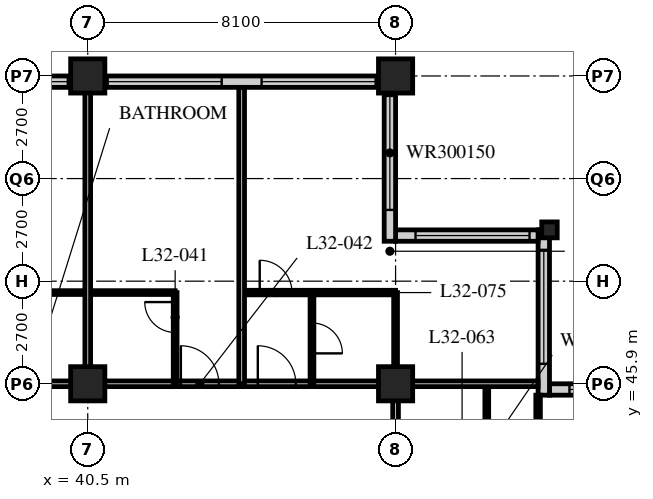
"""IFC4 building model, lengths in metres.
Left out: names, types, materials, properties, quantities, classifications, styles, units other than length and angle.
Written with IfcOpenShell. Run it as: python <this file> out.ifc"""

import sys

from ifc_helpers import new_model, si_unit, direction, frame, frame_2d, origin, origin_2d, place, context, subcontext, project, spatial, rectangle, hollow_rectangle, i_section, extrude, element, fill, save


model = new_model("IFC4")
c1 = context("Model", 3, precision=1e-05, world=origin(), true_north=direction((0.0, 1.0)))
c2 = subcontext(c1, "Body", "Model", "MODEL_VIEW")
j1 = project(units=[si_unit("LENGTHUNIT", "METRE"), si_unit("PLANEANGLEUNIT", "RADIAN")], contexts=[c1])
p1 = place(None, origin())
s1 = spatial("IfcSite", under=j1, at=p1, CompositionType="ELEMENT")
p2 = place(p1, origin())
s2 = spatial("IfcBuilding", under=s1, at=p2, CompositionType="ELEMENT")
p3 = place(p2, frame((0.0, 0.0, 127.2)))
s3 = spatial("IfcBuildingStorey", under=s2, at=p3, CompositionType="ELEMENT", Elevation=127.2)
for number, where, z_axis, x_axis in (
    (1, (40.5, 45.9, 0.0), (0.0, 0.0, 1.0), (1.0, 0.0, 0.0)),
    (2, (40.5, 54.0, 0.0), (0.0, 0.0, 1.0), (1.0, 0.0, 0.0)),
    (3, (48.6, 45.9, 0.0), (0.0, 0.0, 1.0), (1.0, 0.0, 0.0)),
    (4, (48.6, 54.0, 0.0), (0.0, 0.0, 1.0), (1.0, 0.0, 0.0)),
):
    element("IfcColumn", number, at=place(p3, frame(where, z_axis=z_axis, x_axis=x_axis)), inside=s3, PredefinedType="COLUMN", context=c2, shape_type="SweptSolid", body=[
        extrude(hollow_rectangle(XDim=0.9, YDim=0.9, WallThickness=0.09, at=origin_2d()), origin(), (0.0, 0.0, 1.0), 3.4),
    ])
p4 = place(p3, frame((52.65, 49.95, 0.0), z_axis=(0.0, 0.0, 1.0), x_axis=(1.0, 0.0, 0.0)))
e5 = element("IfcColumn", 5, at=p4, inside=s3, PredefinedType="COLUMN", context=c2, shape_type="SweptSolid", body=[
    extrude(i_section(OverallWidth=0.407, OverallDepth=0.419, WebThickness=0.031, FlangeThickness=0.049, FilletRadius=0.015, at=origin_2d()), origin(), (0.0, 0.0, 1.0), 3.4),
])
p5 = place(p3, frame((56.4, 45.75, 0.0), z_axis=(0.0, 0.0, 1.0), x_axis=(-1.0, 0.0, 0.0)))
e6 = element("IfcWall", 6, at=p5, inside=s3, PredefinedType="SOLIDWALL", context=c2, shape_type="SweptSolid", body=[
    extrude(rectangle(XDim=3.75, YDim=0.3, at=frame_2d((1.875, 0.0))), origin(), (0.0, 0.0, 1.0), 3.19),
])
p6 = place(p5, frame((0.225, 0.0, 0.9)))
e7 = element("IfcOpeningElement", 7, at=p6, cuts=e6, PredefinedType="OPENING", context=c2, shape_type="SweptSolid", body=[
    extrude(rectangle(XDim=3.0, YDim=1.5, at=frame_2d((1.5, 0.75))), frame((0.0, 0.16, 0.0), z_axis=(0.0, -1.0, 0.0), x_axis=(1.0, 0.0, 0.0)), (0.0, 0.0, 1.0), 0.32),
])
p7 = place(p3, frame((52.5, 45.6, 0.0), z_axis=(0.0, 0.0, 1.0), x_axis=(0.0, 1.0, 0.0)))
e8 = element("IfcWall", 8, at=p7, inside=s3, PredefinedType="SOLIDWALL", context=c2, shape_type="SweptSolid", body=[
    extrude(rectangle(XDim=4.35, YDim=0.3, at=frame_2d((2.175, 0.0))), origin(), (0.0, 0.0, 1.0), 3.19),
])
p8 = place(p7, frame((0.825, 0.0, 0.9)))
e9 = element("IfcOpeningElement", 9, at=p8, cuts=e8, PredefinedType="OPENING", context=c2, shape_type="SweptSolid", body=[
    extrude(rectangle(XDim=3.0, YDim=1.5, at=frame_2d((1.5, 0.75))), frame((0.0, 0.16, 0.0), z_axis=(0.0, -1.0, 0.0), x_axis=(1.0, 0.0, 0.0)), (0.0, 0.0, 1.0), 0.32),
])
p9 = place(p3, frame((52.35, 49.8, 0.0), z_axis=(0.0, 0.0, 1.0), x_axis=(-1.0, 0.0, 0.0)))
e10 = element("IfcWall", 10, at=p9, inside=s3, PredefinedType="SOLIDWALL", context=c2, shape_type="SweptSolid", body=[
    extrude(rectangle(XDim=3.75, YDim=0.3, at=frame_2d((1.875, 0.0))), origin(), (0.0, 0.0, 1.0), 3.19),
])
p10 = place(p9, frame((0.225, 0.0, 0.9)))
e11 = element("IfcOpeningElement", 11, at=p10, cuts=e10, PredefinedType="OPENING", context=c2, shape_type="SweptSolid", body=[
    extrude(rectangle(XDim=3.0, YDim=1.5, at=frame_2d((1.5, 0.75))), frame((0.0, 0.16, 0.0), z_axis=(0.0, -1.0, 0.0), x_axis=(1.0, 0.0, 0.0)), (0.0, 0.0, 1.0), 0.32),
])
p11 = place(p3, frame((48.45, 49.65, 0.0), z_axis=(0.0, 0.0, 1.0), x_axis=(0.0, 1.0, 0.0)))
e12 = element("IfcWall", 12, at=p11, inside=s3, PredefinedType="SOLIDWALL", context=c2, shape_type="SweptSolid", body=[
    extrude(rectangle(XDim=4.35, YDim=0.3, at=frame_2d((2.175, 0.0))), origin(), (0.0, 0.0, 1.0), 3.19),
])
p12 = place(p11, frame((0.825, 0.0, 0.9)))
e13 = element("IfcOpeningElement", 13, at=p12, cuts=e12, PredefinedType="OPENING", context=c2, shape_type="SweptSolid", body=[
    extrude(rectangle(XDim=3.0, YDim=1.5, at=frame_2d((1.5, 0.75))), frame((0.0, 0.16, 0.0), z_axis=(0.0, -1.0, 0.0), x_axis=(1.0, 0.0, 0.0)), (0.0, 0.0, 1.0), 0.32),
])
p13 = place(p3, frame((48.3, 53.85, 0.0), z_axis=(0.0, 0.0, 1.0), x_axis=(-1.0, 0.0, 0.0)))
e14 = element("IfcWall", 14, at=p13, inside=s3, PredefinedType="SOLIDWALL", context=c2, shape_type="SweptSolid", body=[
    extrude(rectangle(XDim=40.2, YDim=0.3, at=frame_2d((20.1, 0.0))), origin(), (0.0, 0.0, 1.0), 3.19),
])
p14 = place(p13, frame((0.225, 0.0, 0.9)))
e15 = element("IfcOpeningElement", 15, at=p14, cuts=e14, PredefinedType="OPENING", context=c2, shape_type="SweptSolid", body=[
    extrude(rectangle(XDim=3.0, YDim=2.0, at=frame_2d((1.5, 1.0))), frame((0.0, 0.16, 0.0), z_axis=(0.0, -1.0, 0.0), x_axis=(1.0, 0.0, 0.0)), (0.0, 0.0, 1.0), 0.32),
])
p15 = place(p13, frame((4.275, 0.0, 0.9)))
e16 = element("IfcOpeningElement", 16, at=p15, cuts=e14, PredefinedType="OPENING", context=c2, shape_type="SweptSolid", body=[
    extrude(rectangle(XDim=3.0, YDim=2.0, at=frame_2d((1.5, 1.0))), frame((0.0, 0.16, 0.0), z_axis=(0.0, -1.0, 0.0), x_axis=(1.0, 0.0, 0.0)), (0.0, 0.0, 1.0), 0.32),
])
p16 = place(p13, frame((8.325, 0.0, 0.9)))
e17 = element("IfcOpeningElement", 17, at=p16, cuts=e14, PredefinedType="OPENING", context=c2, shape_type="SweptSolid", body=[
    extrude(rectangle(XDim=3.0, YDim=2.0, at=frame_2d((1.5, 1.0))), frame((0.0, 0.16, 0.0), z_axis=(0.0, -1.0, 0.0), x_axis=(1.0, 0.0, 0.0)), (0.0, 0.0, 1.0), 0.32),
])
p17 = place(p13, frame((12.375, 0.0, 0.9)))
e18 = element("IfcOpeningElement", 18, at=p17, cuts=e14, PredefinedType="OPENING", context=c2, shape_type="SweptSolid", body=[
    extrude(rectangle(XDim=3.0, YDim=2.0, at=frame_2d((1.5, 1.0))), frame((0.0, 0.16, 0.0), z_axis=(0.0, -1.0, 0.0), x_axis=(1.0, 0.0, 0.0)), (0.0, 0.0, 1.0), 0.32),
])
p18 = place(p13, frame((16.425, 0.0, 0.9)))
e19 = element("IfcOpeningElement", 19, at=p18, cuts=e14, PredefinedType="OPENING", context=c2, shape_type="SweptSolid", body=[
    extrude(rectangle(XDim=3.0, YDim=2.0, at=frame_2d((1.5, 1.0))), frame((0.0, 0.16, 0.0), z_axis=(0.0, -1.0, 0.0), x_axis=(1.0, 0.0, 0.0)), (0.0, 0.0, 1.0), 0.32),
])
p19 = place(p13, frame((20.475, 0.0, 0.9)))
e20 = element("IfcOpeningElement", 20, at=p19, cuts=e14, PredefinedType="OPENING", context=c2, shape_type="SweptSolid", body=[
    extrude(rectangle(XDim=3.0, YDim=2.0, at=frame_2d((1.5, 1.0))), frame((0.0, 0.16, 0.0), z_axis=(0.0, -1.0, 0.0), x_axis=(1.0, 0.0, 0.0)), (0.0, 0.0, 1.0), 0.32),
])
p20 = place(p13, frame((24.525, 0.0, 0.9)))
e21 = element("IfcOpeningElement", 21, at=p20, cuts=e14, PredefinedType="OPENING", context=c2, shape_type="SweptSolid", body=[
    extrude(rectangle(XDim=3.0, YDim=2.0, at=frame_2d((1.5, 1.0))), frame((0.0, 0.16, 0.0), z_axis=(0.0, -1.0, 0.0), x_axis=(1.0, 0.0, 0.0)), (0.0, 0.0, 1.0), 0.32),
])
p21 = place(p13, frame((28.575, 0.0, 0.9)))
e22 = element("IfcOpeningElement", 22, at=p21, cuts=e14, PredefinedType="OPENING", context=c2, shape_type="SweptSolid", body=[
    extrude(rectangle(XDim=3.0, YDim=2.0, at=frame_2d((1.5, 1.0))), frame((0.0, 0.16, 0.0), z_axis=(0.0, -1.0, 0.0), x_axis=(1.0, 0.0, 0.0)), (0.0, 0.0, 1.0), 0.32),
])
p22 = place(p13, frame((32.625, 0.0, 0.9)))
e23 = element("IfcOpeningElement", 23, at=p22, cuts=e14, PredefinedType="OPENING", context=c2, shape_type="SweptSolid", body=[
    extrude(rectangle(XDim=3.0, YDim=2.0, at=frame_2d((1.5, 1.0))), frame((0.0, 0.16, 0.0), z_axis=(0.0, -1.0, 0.0), x_axis=(1.0, 0.0, 0.0)), (0.0, 0.0, 1.0), 0.32),
])
p23 = place(p13, frame((36.675, 0.0, 0.9)))
e24 = element("IfcOpeningElement", 24, at=p23, cuts=e14, PredefinedType="OPENING", context=c2, shape_type="SweptSolid", body=[
    extrude(rectangle(XDim=3.0, YDim=2.0, at=frame_2d((1.5, 1.0))), frame((0.0, 0.16, 0.0), z_axis=(0.0, -1.0, 0.0), x_axis=(1.0, 0.0, 0.0)), (0.0, 0.0, 1.0), 0.32),
])
p24 = place(p3, frame((8.1, 45.9, 0.0), z_axis=(0.0, 0.0, 1.0), x_axis=(1.0, 0.0, 0.0)))
e25 = element("IfcWall", 25, at=p24, inside=s3, PredefinedType="PARTITIONING", context=c2, shape_type="SweptSolid", body=[
    extrude(rectangle(XDim=40.5, YDim=0.15, at=frame_2d((20.25, 0.0))), origin(), (0.0, 0.0, 1.0), 2.578),
])
p25 = place(p24, frame((9.625, 0.0, 0.0)))
e26 = element("IfcOpeningElement", 26, at=p25, cuts=e25, PredefinedType="OPENING", context=c2, shape_type="SweptSolid", body=[
    extrude(rectangle(XDim=1.0, YDim=2.1, at=frame_2d((0.5, 1.05))), frame((0.0, 0.085, 0.0), z_axis=(0.0, -1.0, 0.0), x_axis=(1.0, 0.0, 0.0)), (0.0, 0.0, 1.0), 0.17),
])
p26 = place(p24, frame((21.65, 0.0, 0.0)))
e27 = element("IfcOpeningElement", 27, at=p26, cuts=e25, PredefinedType="OPENING", context=c2, shape_type="SweptSolid", body=[
    extrude(rectangle(XDim=1.0, YDim=2.1, at=frame_2d((0.5, 1.05))), frame((0.0, 0.085, 0.0), z_axis=(0.0, -1.0, 0.0), x_axis=(1.0, 0.0, 0.0)), (0.0, 0.0, 1.0), 0.17),
])
p27 = place(p24, frame((26.75, 0.0, 0.0)))
e28 = element("IfcOpeningElement", 28, at=p27, cuts=e25, PredefinedType="OPENING", context=c2, shape_type="SweptSolid", body=[
    extrude(rectangle(XDim=1.0, YDim=2.1, at=frame_2d((0.5, 1.05))), frame((0.0, 0.085, 0.0), z_axis=(0.0, -1.0, 0.0), x_axis=(1.0, 0.0, 0.0)), (0.0, 0.0, 1.0), 0.17),
])
p28 = place(p24, frame((28.95, 0.0, 0.0)))
e29 = element("IfcOpeningElement", 29, at=p28, cuts=e25, PredefinedType="OPENING", context=c2, shape_type="SweptSolid", body=[
    extrude(rectangle(XDim=1.0, YDim=2.1, at=frame_2d((0.5, 1.05))), frame((0.0, 0.085, 0.0), z_axis=(0.0, -1.0, 0.0), x_axis=(1.0, 0.0, 0.0)), (0.0, 0.0, 1.0), 0.17),
])
p29 = place(p24, frame((34.85, 0.0, 0.0)))
e30 = element("IfcOpeningElement", 30, at=p29, cuts=e25, PredefinedType="OPENING", context=c2, shape_type="SweptSolid", body=[
    extrude(rectangle(XDim=1.0, YDim=2.1, at=frame_2d((0.5, 1.05))), frame((0.0, 0.085, 0.0), z_axis=(0.0, -1.0, 0.0), x_axis=(1.0, 0.0, 0.0)), (0.0, 0.0, 1.0), 0.17),
])
p30 = place(p24, frame((36.875, 0.0, 0.0)))
e31 = element("IfcOpeningElement", 31, at=p30, cuts=e25, PredefinedType="OPENING", context=c2, shape_type="SweptSolid", body=[
    extrude(rectangle(XDim=1.0, YDim=2.1, at=frame_2d((0.5, 1.05))), frame((0.0, 0.085, 0.0), z_axis=(0.0, -1.0, 0.0), x_axis=(1.0, 0.0, 0.0)), (0.0, 0.0, 1.0), 0.17),
])
p31 = place(p24, frame((2.625, 0.0, 0.0)))
e32 = element("IfcOpeningElement", 32, at=p31, cuts=e25, PredefinedType="OPENING", context=c2, shape_type="SweptSolid", body=[
    extrude(rectangle(XDim=1.0, YDim=2.1, at=frame_2d((0.5, 1.05))), frame((0.0, 0.085, 0.0), z_axis=(0.0, -1.0, 0.0), x_axis=(1.0, 0.0, 0.0)), (0.0, 0.0, 1.0), 0.17),
])
p32 = place(p3, frame((48.6, 21.6, 0.0), z_axis=(0.0, 0.0, 1.0), x_axis=(0.0, 1.0, 0.0)))
e33 = element("IfcWall", 33, at=p32, inside=s3, PredefinedType="PARTITIONING", context=c2, shape_type="SweptSolid", body=[
    extrude(rectangle(XDim=24.3, YDim=0.15, at=frame_2d((12.15, 0.0))), origin(), (0.0, 0.0, 1.0), 2.578),
])
p33 = place(p32, frame((2.75, 0.0, 0.0)))
e34 = element("IfcOpeningElement", 34, at=p33, cuts=e33, PredefinedType="OPENING", context=c2, shape_type="SweptSolid", body=[
    extrude(rectangle(XDim=1.0, YDim=2.1, at=frame_2d((0.5, 1.05))), frame((0.0, 0.085, 0.0), z_axis=(0.0, -1.0, 0.0), x_axis=(1.0, 0.0, 0.0)), (0.0, 0.0, 1.0), 0.17),
])
p34 = place(p32, frame((4.65, 0.0, 0.0)))
e35 = element("IfcOpeningElement", 35, at=p34, cuts=e33, PredefinedType="OPENING", context=c2, shape_type="SweptSolid", body=[
    extrude(rectangle(XDim=1.0, YDim=2.1, at=frame_2d((0.5, 1.05))), frame((0.0, 0.085, 0.0), z_axis=(0.0, -1.0, 0.0), x_axis=(1.0, 0.0, 0.0)), (0.0, 0.0, 1.0), 0.17),
])
p35 = place(p32, frame((10.0, 0.0, 0.0)))
e36 = element("IfcOpeningElement", 36, at=p35, cuts=e33, PredefinedType="OPENING", context=c2, shape_type="SweptSolid", body=[
    extrude(rectangle(XDim=1.0, YDim=2.1, at=frame_2d((0.5, 1.05))), frame((0.0, 0.085, 0.0), z_axis=(0.0, -1.0, 0.0), x_axis=(1.0, 0.0, 0.0)), (0.0, 0.0, 1.0), 0.17),
])
p36 = place(p32, frame((18.1, 0.0, 0.0)))
e37 = element("IfcOpeningElement", 37, at=p36, cuts=e33, PredefinedType="OPENING", context=c2, shape_type="SweptSolid", body=[
    extrude(rectangle(XDim=1.0, YDim=2.1, at=frame_2d((0.5, 1.05))), frame((0.0, 0.085, 0.0), z_axis=(0.0, -1.0, 0.0), x_axis=(1.0, 0.0, 0.0)), (0.0, 0.0, 1.0), 0.17),
])
p37 = place(p3, frame((38.2, 48.3, 0.0), z_axis=(0.0, 0.0, 1.0), x_axis=(1.0, 0.0, 0.0)))
e38 = element("IfcWall", 38, at=p37, inside=s3, PredefinedType="PARTITIONING", context=c2, shape_type="SweptSolid", body=[
    extrude(rectangle(XDim=4.6, YDim=0.1, at=frame_2d((2.3, 0.0))), origin(), (0.0, 0.0, 1.0), 3.19),
])
p38 = place(p3, frame((40.5, 45.9, 0.0), z_axis=(0.0, 0.0, 1.0), x_axis=(0.0, 1.0, 0.0)))
e39 = element("IfcWall", 39, at=p38, inside=s3, PredefinedType="PARTITIONING", context=c2, shape_type="SweptSolid", body=[
    extrude(rectangle(XDim=7.8, YDim=0.15, at=frame_2d((3.9, 0.0))), origin(), (0.0, 0.0, 1.0), 2.578),
])
p39 = place(p3, frame((42.8, 45.9, 0.0), z_axis=(0.0, 0.0, 1.0), x_axis=(0.0, 1.0, 0.0)))
e40 = element("IfcWall", 40, at=p39, inside=s3, PredefinedType="PARTITIONING", context=c2, shape_type="SweptSolid", body=[
    extrude(rectangle(XDim=2.4, YDim=0.1, at=frame_2d((1.2, 0.0))), origin(), (0.0, 0.0, 1.0), 3.19),
])
p40 = place(p39, frame((1.35, 0.0, 0.0)))
e41 = element("IfcOpeningElement", 41, at=p40, cuts=e40, PredefinedType="OPENING", context=c2, shape_type="SweptSolid", body=[
    extrude(rectangle(XDim=0.8, YDim=2.1, at=frame_2d((0.4, 1.05))), frame((0.0, 0.06, 0.0), z_axis=(0.0, -1.0, 0.0), x_axis=(1.0, 0.0, 0.0)), (0.0, 0.0, 1.0), 0.12),
])
p41 = place(p3, frame((51.0, 43.3, 0.0), z_axis=(0.0, 0.0, 1.0), x_axis=(0.0, 1.0, 0.0)))
e42 = element("IfcWall", 42, at=p41, inside=s3, PredefinedType="PARTITIONING", context=c2, shape_type="SweptSolid", body=[
    extrude(rectangle(XDim=2.6, YDim=0.1, at=frame_2d((1.3, 0.0))), origin(), (0.0, 0.0, 1.0), 3.19),
])
p42 = place(p3, frame((44.55, 48.3, 0.0), z_axis=(0.0, 0.0, 1.0), x_axis=(1.0, 0.0, 0.0)))
e43 = element("IfcWall", 43, at=p42, inside=s3, PredefinedType="PARTITIONING", context=c2, shape_type="SweptSolid", body=[
    extrude(rectangle(XDim=4.05, YDim=0.12, at=frame_2d((2.025, 0.0))), origin(), (0.0, 0.0, 1.0), 3.19),
])
p43 = place(p42, frame((0.475, 0.0, 0.0)))
e44 = element("IfcOpeningElement", 44, at=p43, cuts=e43, PredefinedType="OPENING", context=c2, shape_type="SweptSolid", body=[
    extrude(rectangle(XDim=0.85, YDim=2.1, at=frame_2d((0.425, 1.05))), frame((0.0, 0.07, 0.0), z_axis=(0.0, -1.0, 0.0), x_axis=(1.0, 0.0, 0.0)), (0.0, 0.0, 1.0), 0.14),
])
p44 = place(p3, frame((46.4, 45.9, 0.0), z_axis=(0.0, 0.0, 1.0), x_axis=(0.0, 1.0, 0.0)))
e45 = element("IfcWall", 45, at=p44, inside=s3, PredefinedType="PARTITIONING", context=c2, shape_type="SweptSolid", body=[
    extrude(rectangle(XDim=2.4, YDim=0.1, at=frame_2d((1.2, 0.0))), origin(), (0.0, 0.0, 1.0), 3.19),
])
p45 = place(p44, frame((0.8, 0.0, 0.0)))
e46 = element("IfcOpeningElement", 46, at=p45, cuts=e45, PredefinedType="OPENING", context=c2, shape_type="SweptSolid", body=[
    extrude(rectangle(XDim=0.8, YDim=2.1, at=frame_2d((0.4, 1.05))), frame((0.0, 0.06, 0.0), z_axis=(0.0, -1.0, 0.0), x_axis=(1.0, 0.0, 0.0)), (0.0, 0.0, 1.0), 0.12),
])
p46 = place(p3, frame((48.6, 45.9, 0.0), z_axis=(0.0, 0.0, 1.0), x_axis=(0.0, 1.0, 0.0)))
e47 = element("IfcWall", 47, at=p46, inside=s3, PredefinedType="PARTITIONING", context=c2, shape_type="SweptSolid", body=[
    extrude(rectangle(XDim=2.4, YDim=0.1, at=frame_2d((1.2, 0.0))), origin(), (0.0, 0.0, 1.0), 2.578),
])
p47 = place(p3, frame((48.6, 45.9, 0.0), z_axis=(0.0, 0.0, 1.0), x_axis=(1.0, 0.0, 0.0)))
e48 = element("IfcWall", 48, at=p47, inside=s3, PredefinedType="PARTITIONING", context=c2, shape_type="SweptSolid", body=[
    extrude(rectangle(XDim=3.75, YDim=0.15, at=frame_2d((1.875, 0.0))), origin(), (0.0, 0.0, 1.0), 2.578),
])
p48 = place(p3, frame((44.55, 45.9, 0.0), z_axis=(0.0, 0.0, 1.0), x_axis=(0.0, 1.0, 0.0)))
e49 = element("IfcWall", 49, at=p48, inside=s3, PredefinedType="PARTITIONING", context=c2, shape_type="SweptSolid", body=[
    extrude(rectangle(XDim=7.8, YDim=0.15, at=frame_2d((3.9, 0.0))), origin(), (0.0, 0.0, 1.0), 3.19),
])
p49 = place(p3, frame((52.35, 45.6, 0.0), z_axis=(0.0, 0.0, 1.0), x_axis=(0.0, -1.0, 0.0)))
e50 = element("IfcWall", 50, at=p49, inside=s3, PredefinedType="PARTITIONING", context=c2, shape_type="SweptSolid", body=[
    extrude(rectangle(XDim=3.75, YDim=0.12, at=frame_2d((1.875, 0.0))), origin(), (0.0, 0.0, 1.0), 3.19),
])
p50 = place(p49, frame((2.625, 0.0, 0.0)))
e51 = element("IfcOpeningElement", 51, at=p50, cuts=e50, PredefinedType="OPENING", context=c2, shape_type="SweptSolid", body=[
    extrude(rectangle(XDim=0.85, YDim=2.1, at=frame_2d((0.425, 1.05))), frame((0.0, 0.07, 0.0), z_axis=(0.0, -1.0, 0.0), x_axis=(1.0, 0.0, 0.0)), (0.0, 0.0, 1.0), 0.14),
])
p51 = place(p6, origin())
e52 = element("IfcWindow", 52, at=p51, inside=s3, PartitioningType="SINGLE_PANEL", PredefinedType="WINDOW", context=c2, shape_type="SweptSolid", body=[
    extrude(rectangle(XDim=3.0, YDim=1.5, at=frame_2d((1.5, 0.75))), frame((0.0, 0.03, 0.0), z_axis=(0.0, -1.0, 0.0), x_axis=(1.0, 0.0, 0.0)), (0.0, 0.0, 1.0), 0.06),
])
fill(e7, e52)
p52 = place(p8, origin())
e53 = element("IfcWindow", 53, at=p52, inside=s3, PartitioningType="SINGLE_PANEL", PredefinedType="WINDOW", context=c2, shape_type="SweptSolid", body=[
    extrude(rectangle(XDim=3.0, YDim=1.5, at=frame_2d((1.5, 0.75))), frame((0.0, 0.03, 0.0), z_axis=(0.0, -1.0, 0.0), x_axis=(1.0, 0.0, 0.0)), (0.0, 0.0, 1.0), 0.06),
])
fill(e9, e53)
p53 = place(p10, origin())
e54 = element("IfcWindow", 54, at=p53, inside=s3, PartitioningType="SINGLE_PANEL", PredefinedType="WINDOW", context=c2, shape_type="SweptSolid", body=[
    extrude(rectangle(XDim=3.0, YDim=1.5, at=frame_2d((1.5, 0.75))), frame((0.0, 0.03, 0.0), z_axis=(0.0, -1.0, 0.0), x_axis=(1.0, 0.0, 0.0)), (0.0, 0.0, 1.0), 0.06),
])
fill(e11, e54)
p54 = place(p12, origin())
e55 = element("IfcWindow", 55, at=p54, inside=s3, PartitioningType="SINGLE_PANEL", PredefinedType="WINDOW", context=c2, shape_type="SweptSolid", body=[
    extrude(rectangle(XDim=3.0, YDim=1.5, at=frame_2d((1.5, 0.75))), frame((0.0, 0.03, 0.0), z_axis=(0.0, -1.0, 0.0), x_axis=(1.0, 0.0, 0.0)), (0.0, 0.0, 1.0), 0.06),
])
fill(e13, e55)
p55 = place(p14, origin())
e56 = element("IfcWindow", 56, at=p55, inside=s3, PartitioningType="SINGLE_PANEL", PredefinedType="WINDOW", context=c2, shape_type="SweptSolid", body=[
    extrude(rectangle(XDim=3.0, YDim=2.0, at=frame_2d((1.5, 1.0))), frame((0.0, 0.03, 0.0), z_axis=(0.0, -1.0, 0.0), x_axis=(1.0, 0.0, 0.0)), (0.0, 0.0, 1.0), 0.06),
])
fill(e15, e56)
p56 = place(p15, origin())
e57 = element("IfcWindow", 57, at=p56, inside=s3, PartitioningType="SINGLE_PANEL", PredefinedType="WINDOW", context=c2, shape_type="SweptSolid", body=[
    extrude(rectangle(XDim=3.0, YDim=2.0, at=frame_2d((1.5, 1.0))), frame((0.0, 0.03, 0.0), z_axis=(0.0, -1.0, 0.0), x_axis=(1.0, 0.0, 0.0)), (0.0, 0.0, 1.0), 0.06),
])
fill(e16, e57)
p57 = place(p16, origin())
e58 = element("IfcWindow", 58, at=p57, inside=s3, PartitioningType="SINGLE_PANEL", PredefinedType="WINDOW", context=c2, shape_type="SweptSolid", body=[
    extrude(rectangle(XDim=3.0, YDim=2.0, at=frame_2d((1.5, 1.0))), frame((0.0, 0.03, 0.0), z_axis=(0.0, -1.0, 0.0), x_axis=(1.0, 0.0, 0.0)), (0.0, 0.0, 1.0), 0.06),
])
fill(e17, e58)
p58 = place(p40, origin())
e59 = element("IfcDoor", 59, at=p58, inside=s3, OperationType="SINGLE_SWING_RIGHT", PredefinedType="DOOR", context=c2, shape_type="SweptSolid", body=[
    extrude(rectangle(XDim=0.8, YDim=2.1, at=frame_2d((0.4, 1.05))), frame((0.0, 0.025, 0.0), z_axis=(0.0, -1.0, 0.0), x_axis=(1.0, 0.0, 0.0)), (0.0, 0.0, 1.0), 0.05),
])
fill(e41, e59)
p59 = place(p29, origin())
e60 = element("IfcDoor", 60, at=p59, inside=s3, OperationType="SINGLE_SWING_LEFT", PredefinedType="DOOR", context=c2, shape_type="SweptSolid", body=[
    extrude(rectangle(XDim=1.0, YDim=2.1, at=frame_2d((0.5, 1.05))), frame((0.0, 0.025, 0.0), z_axis=(0.0, -1.0, 0.0), x_axis=(1.0, 0.0, 0.0)), (0.0, 0.0, 1.0), 0.05),
])
fill(e30, e60)
p60 = place(p45, origin())
e61 = element("IfcDoor", 61, at=p60, inside=s3, OperationType="SINGLE_SWING_RIGHT", PredefinedType="DOOR", context=c2, shape_type="SweptSolid", body=[
    extrude(rectangle(XDim=0.8, YDim=2.1, at=frame_2d((0.4, 1.05))), frame((0.0, 0.025, 0.0), z_axis=(0.0, -1.0, 0.0), x_axis=(1.0, 0.0, 0.0)), (0.0, 0.0, 1.0), 0.05),
])
fill(e46, e61)
p61 = place(p30, origin())
e62 = element("IfcDoor", 62, at=p61, inside=s3, OperationType="SINGLE_SWING_LEFT", PredefinedType="DOOR", context=c2, shape_type="SweptSolid", body=[
    extrude(rectangle(XDim=1.0, YDim=2.1, at=frame_2d((0.5, 1.05))), frame((0.0, 0.025, 0.0), z_axis=(0.0, -1.0, 0.0), x_axis=(1.0, 0.0, 0.0)), (0.0, 0.0, 1.0), 0.05),
])
fill(e31, e62)
p62 = place(p43, origin())
e63 = element("IfcDoor", 63, at=p62, inside=s3, OperationType="SINGLE_SWING_LEFT", PredefinedType="DOOR", context=c2, shape_type="SweptSolid", body=[
    extrude(rectangle(XDim=0.85, YDim=2.1, at=frame_2d((0.425, 1.05))), frame((0.0, 0.025, 0.0), z_axis=(0.0, -1.0, 0.0), x_axis=(1.0, 0.0, 0.0)), (0.0, 0.0, 1.0), 0.05),
])
fill(e44, e63)
save(model, sys.argv[1])
